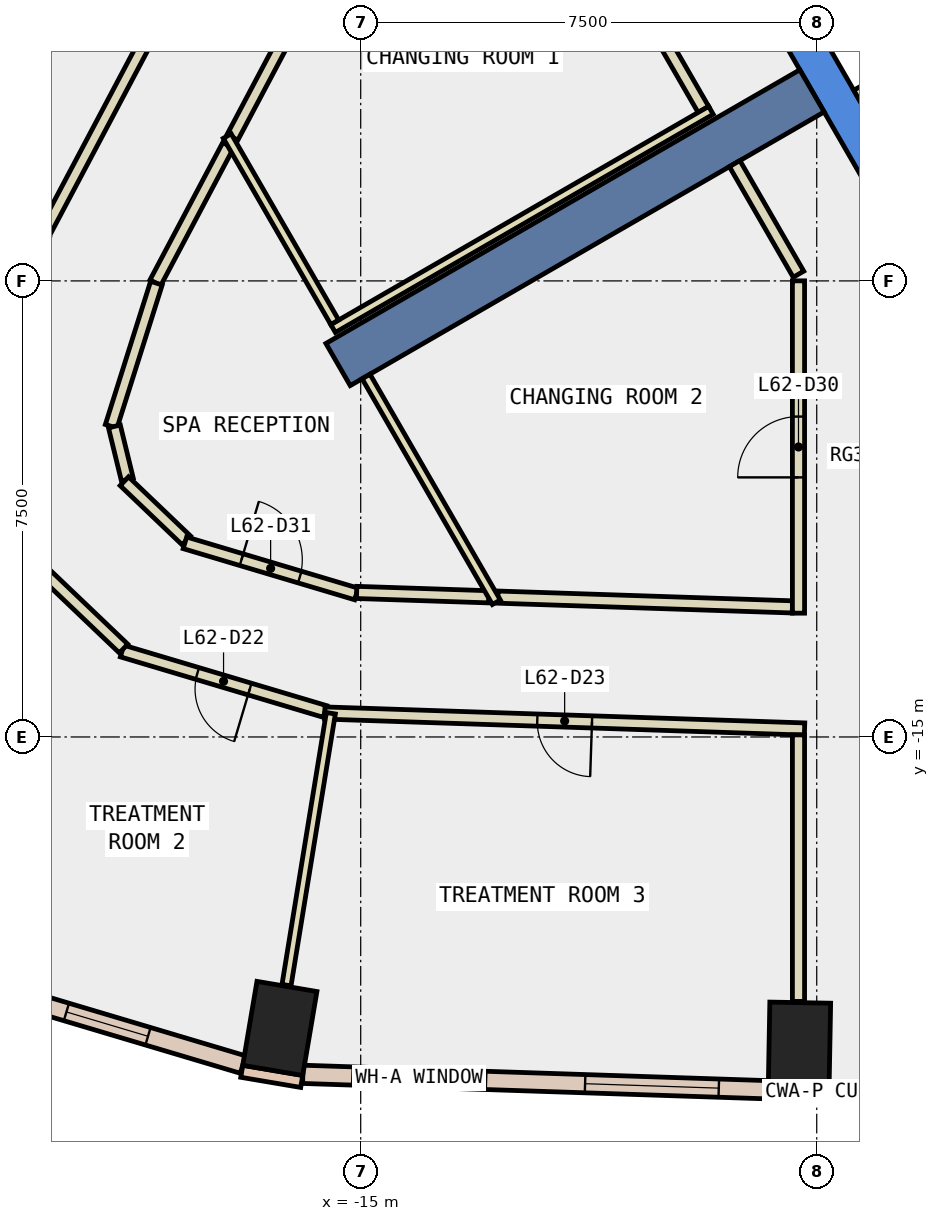
"""IFC4 building model, lengths in metres.
Left out: names, types, materials, properties, quantities, classifications, styles, units other than length and angle.
Written with IfcOpenShell. Run it as: python <this file> out.ifc"""

import sys

from ifc_helpers import new_model, si_unit, direction, frame, frame_2d, origin, origin_2d, place, context, subcontext, project, spatial, polyline, rectangle, outline, extrude, element, fill, save


model = new_model("IFC4")
c1 = context("Model", 3, precision=1e-05, world=origin(), true_north=direction((0.0, 1.0)))
c2 = subcontext(c1, "Body", "Model", "MODEL_VIEW")
j1 = project(units=[si_unit("LENGTHUNIT", "METRE"), si_unit("PLANEANGLEUNIT", "RADIAN")], contexts=[c1])
p1 = place(None, origin())
s1 = spatial("IfcSite", under=j1, at=p1, CompositionType="ELEMENT")
p2 = place(p1, origin())
s2 = spatial("IfcBuilding", under=s1, at=p2, CompositionType="ELEMENT")
p3 = place(p2, frame((0.0, 0.0, 270.2)))
s3 = spatial("IfcBuildingStorey", under=s2, at=p3, CompositionType="ELEMENT", Elevation=270.2)
for number, where, z_axis, x_axis in (
    (1, (-16.33, -19.793, -0.34), (0.0, 0.0, 1.0), (-0.986, 0.167, 0.0)),
    (2, (-7.784, -20.069, -0.34), (0.0, 0.0, 1.0), (-1.0, 0.018, 0.0)),
):
    element("IfcColumn", number, at=place(p3, frame(where, z_axis=z_axis, x_axis=x_axis)), inside=s3, PredefinedType="COLUMN", context=c2, shape_type="SweptSolid", body=[
        extrude(rectangle(XDim=1.0, YDim=1.4, at=origin_2d()), origin(), (0.0, 0.0, 1.0), 3.6),
    ])
p4 = place(p3, frame((0.0, 0.0, -0.34)))
e3 = element("IfcWall", 3, at=p4, inside=s3, PredefinedType="SHEAR", context=c2, shape_type="SweptSolid", body=[
    extrude(outline(polyline([(-11.547, 2.5), (-5.774, -7.5), (-5.427, -6.9), (-10.854, 2.5), (-11.547, 2.5)])), origin(), (0.0, 0.0, 1.0), 3.6),
])
p5 = place(p3, frame((-7.578, -4.375, -0.34), z_axis=(0.0, 0.0, 1.0), x_axis=(-0.866024315419, -0.5000018851, 0.0)))
e4 = element("IfcWall", 4, at=p5, inside=s3, PredefinedType="SHEAR", context=c2, shape_type="SweptSolid", body=[
    extrude(rectangle(XDim=9.0, YDim=0.8, at=frame_2d((4.5, 0.0))), origin(), (0.0, 0.0, 1.0), 3.6),
])
for number, where, z_axis, x_axis in (
    (5, (-16.956, -20.498, 0.0), (0.0, 0.0, 1.0), (0.986, -0.167, 0.0)),
    (6, (-8.298, -20.86, 0.0), (0.0, 0.0, 1.0), (1.0, -0.018, 0.0)),
):
    element("IfcWall", number, at=place(p3, frame(where, z_axis=z_axis, x_axis=x_axis)), inside=s3, PredefinedType="STANDARD", context=c2, shape_type="SweptSolid", body=[
        extrude(rectangle(XDim=1.0, YDim=0.2, at=frame_2d((0.5, 0.0))), origin(), (0.0, 0.0, 1.0), 3.26),
    ])
p6 = place(p3, frame((-15.951, -20.548, 0.0), z_axis=(0.0, 0.0, 1.0), x_axis=(0.999450376985, -0.033150323459, 0.0)))
e7 = element("IfcWall", 7, at=p6, inside=s3, PredefinedType="STANDARD", context=c2, shape_type="SweptSolid", body=[
    extrude(rectangle(XDim=7.659, YDim=0.3, at=frame_2d((3.83, 0.0))), origin(), (0.0, 0.0, 1.0), 3.26),
])
p7 = place(p6, frame((0.815, 0.0, 0.9)))
e8 = element("IfcOpeningElement", 8, at=p7, cuts=e7, PredefinedType="OPENING", context=c2, shape_type="SweptSolid", body=[
    extrude(rectangle(XDim=2.2, YDim=2.0, at=frame_2d((1.1, 1.0))), frame((0.0, 0.16, 0.0), z_axis=(0.0, -1.0, 0.0), x_axis=(1.0, 0.0, 0.0)), (0.0, 0.0, 1.0), 0.32),
])
p8 = place(p6, frame((4.644, 0.0, 0.9)))
e9 = element("IfcOpeningElement", 9, at=p8, cuts=e7, PredefinedType="OPENING", context=c2, shape_type="SweptSolid", body=[
    extrude(rectangle(XDim=2.2, YDim=2.0, at=frame_2d((1.1, 1.0))), frame((0.0, 0.16, 0.0), z_axis=(0.0, -1.0, 0.0), x_axis=(1.0, 0.0, 0.0)), (0.0, 0.0, 1.0), 0.32),
])
p9 = place(p3, frame((-21.401, -19.057, 0.0), z_axis=(0.0, 0.0, 1.0), x_axis=(0.958361270465, -0.285558532131, 0.0)))
e10 = element("IfcWall", 10, at=p9, inside=s3, PredefinedType="STANDARD", context=c2, shape_type="SweptSolid", body=[
    extrude(rectangle(XDim=4.658, YDim=0.3, at=frame_2d((2.329, 0.0))), origin(), (0.0, 0.0, 1.0), 3.26),
])
p10 = place(p9, frame((1.629, 0.0, 0.9)))
e11 = element("IfcOpeningElement", 11, at=p10, cuts=e10, PredefinedType="OPENING", context=c2, shape_type="SweptSolid", body=[
    extrude(rectangle(XDim=1.4, YDim=2.0, at=frame_2d((0.7, 1.0))), frame((0.0, 0.16, 0.0), z_axis=(0.0, -1.0, 0.0), x_axis=(1.0, 0.0, 0.0)), (0.0, 0.0, 1.0), 0.32),
])
p11 = place(p3, frame((-15.56, -2.214, 0.0), z_axis=(0.0, 0.0, 1.0), x_axis=(-0.468104679961, -0.883673021314, 0.0)))
e12 = element("IfcWall", 12, at=p11, inside=s3, PredefinedType="PARTITIONING", context=c2, shape_type="SweptSolid", body=[
    extrude(rectangle(XDim=3.309, YDim=0.2, at=frame_2d((1.654, 0.0))), origin(), (0.0, 0.0, 1.0), 3.26),
])
p12 = place(p3, frame((-12.744, -12.7, 0.0), z_axis=(0.0, 0.0, 1.0), x_axis=(0.999447196828, -0.033246063702, 0.0)))
e13 = element("IfcWall", 13, at=p12, inside=s3, PredefinedType="PARTITIONING", context=c2, shape_type="SweptSolid", body=[
    extrude(rectangle(XDim=4.847, YDim=0.2, at=frame_2d((2.423, 0.0))), origin(), (0.0, 0.0, 1.0), 3.26),
])
p13 = place(p3, frame((-17.18, -5.271, 0.0), z_axis=(0.0, 0.0, 1.0), x_axis=(-0.468212372113, -0.883615965564, 0.0)))
e14 = element("IfcWall", 14, at=p13, inside=s3, PredefinedType="PARTITIONING", context=c2, shape_type="SweptSolid", body=[
    extrude(rectangle(XDim=2.557, YDim=0.2, at=frame_2d((1.278, 0.0))), origin(), (0.0, 0.0, 1.0), 3.26),
])
p14 = place(p3, frame((-18.36, -7.537, 0.0), z_axis=(0.0, 0.0, 1.0), x_axis=(-0.301325410186, -0.953521366922, 0.0)))
e15 = element("IfcWall", 15, at=p14, inside=s3, PredefinedType="PARTITIONING", context=c2, shape_type="SweptSolid", body=[
    extrude(rectangle(XDim=2.469, YDim=0.2, at=frame_2d((1.234, 0.0))), origin(), (0.0, 0.0, 1.0), 3.26),
])
p15 = place(p3, frame((-19.051, -9.893, 0.0), z_axis=(0.0, 0.0, 1.0), x_axis=(0.237162553963, -0.971469980492, 0.0)))
e16 = element("IfcWall", 16, at=p15, inside=s3, PredefinedType="PARTITIONING", context=c2, shape_type="SweptSolid", body=[
    extrude(rectangle(XDim=0.899, YDim=0.2, at=frame_2d((0.449, 0.0))), origin(), (0.0, 0.0, 1.0), 3.26),
])
p16 = place(p3, frame((-18.887, -10.794, 0.0), z_axis=(0.0, 0.0, 1.0), x_axis=(0.723206051435, -0.690632324155, 0.0)))
e17 = element("IfcWall", 17, at=p16, inside=s3, PredefinedType="PARTITIONING", context=c2, shape_type="SweptSolid", body=[
    extrude(rectangle(XDim=1.409, YDim=0.2, at=frame_2d((0.705, 0.0))), origin(), (0.0, 0.0, 1.0), 3.26),
])
p17 = place(p3, frame((-17.891, -11.807, 0.0), z_axis=(0.0, 0.0, 1.0), x_axis=(0.958288558025, -0.28580244848, 0.0)))
e18 = element("IfcWall", 18, at=p17, inside=s3, PredefinedType="PARTITIONING", context=c2, shape_type="SweptSolid", body=[
    extrude(rectangle(XDim=2.943, YDim=0.2, at=frame_2d((1.471, 0.0))), origin(), (0.0, 0.0, 1.0), 3.26),
])
p18 = place(p17, frame((0.971, 0.0, 0.0)))
e19 = element("IfcOpeningElement", 19, at=p18, cuts=e18, PredefinedType="OPENING", context=c2, shape_type="SweptSolid", body=[
    extrude(rectangle(XDim=1.0, YDim=2.1, at=frame_2d((0.5, 1.05))), frame((0.0, 0.11, 0.0), z_axis=(0.0, -1.0, 0.0), x_axis=(1.0, 0.0, 0.0)), (0.0, 0.0, 1.0), 0.22),
])
p19 = place(p3, frame((-15.067, -12.623, 0.0), z_axis=(0.0, 0.0, 1.0), x_axis=(0.99945112134, -0.033127874247, 0.0)))
e20 = element("IfcWall", 20, at=p19, inside=s3, PredefinedType="PARTITIONING", context=c2, shape_type="SweptSolid", body=[
    extrude(rectangle(XDim=2.174, YDim=0.2, at=frame_2d((1.087, 0.0))), origin(), (0.0, 0.0, 1.0), 3.26),
])
p20 = place(p3, frame((-20.229, -6.754, 0.0), z_axis=(0.0, 0.0, 1.0), x_axis=(0.468313568794, 0.883562335822, 0.0)))
e21 = element("IfcWall", 21, at=p20, inside=s3, PredefinedType="PARTITIONING", context=c2, shape_type="SweptSolid", body=[
    extrude(rectangle(XDim=6.216, YDim=0.2, at=frame_2d((3.108, 0.0))), origin(), (0.0, 0.0, 1.0), 3.26),
])
p21 = place(p3, frame((-15.587, -14.581, 0.0), z_axis=(0.0, 0.0, 1.0), x_axis=(-0.958378336681, 0.285501250052, 0.0)))
e22 = element("IfcWall", 22, at=p21, inside=s3, PredefinedType="PARTITIONING", context=c2, shape_type="SweptSolid", body=[
    extrude(rectangle(XDim=3.482, YDim=0.2, at=frame_2d((1.741, 0.0))), origin(), (0.0, 0.0, 1.0), 3.26),
])
p22 = place(p21, frame((1.291, 0.0, 0.0)))
e23 = element("IfcOpeningElement", 23, at=p22, cuts=e22, PredefinedType="OPENING", context=c2, shape_type="SweptSolid", body=[
    extrude(rectangle(XDim=0.9, YDim=2.1, at=frame_2d((0.45, 1.05))), frame((0.0, 0.11, 0.0), z_axis=(0.0, -1.0, 0.0), x_axis=(1.0, 0.0, 0.0)), (0.0, 0.0, 1.0), 0.22),
])
p23 = place(p3, frame((-18.9, -13.546, 0.0), z_axis=(0.0, 0.0, 1.0), x_axis=(-0.723668833869, 0.690147389248, 0.0)))
e24 = element("IfcWall", 24, at=p23, inside=s3, PredefinedType="PARTITIONING", context=c2, shape_type="SweptSolid", body=[
    extrude(rectangle(XDim=2.476, YDim=0.2, at=frame_2d((1.238, 0.0))), origin(), (0.0, 0.0, 1.0), 3.26),
])
p24 = place(p3, frame((-7.7, -14.869, 0.0), z_axis=(0.0, 0.0, 1.0), x_axis=(-0.999445318732, 0.03330247535, 0.0)))
e25 = element("IfcWall", 25, at=p24, inside=s3, PredefinedType="PARTITIONING", context=c2, shape_type="SweptSolid", body=[
    extrude(rectangle(XDim=7.896, YDim=0.2, at=frame_2d((3.948, 0.0))), origin(), (0.0, 0.0, 1.0), 3.26),
])
p25 = place(p24, frame((3.498, 0.0, 0.0)))
e26 = element("IfcOpeningElement", 26, at=p25, cuts=e25, PredefinedType="OPENING", context=c2, shape_type="SweptSolid", body=[
    extrude(rectangle(XDim=0.9, YDim=2.1, at=frame_2d((0.45, 1.05))), frame((0.0, 0.11, 0.0), z_axis=(0.0, -1.0, 0.0), x_axis=(1.0, 0.0, 0.0)), (0.0, 0.0, 1.0), 0.22),
])
p26 = place(p3, frame((-5.888, -3.902, 0.0), z_axis=(0.0, 0.0, 1.0), x_axis=(-0.86621513555, -0.499671230855, 0.0)))
e27 = element("IfcWall", 27, at=p26, inside=s3, PredefinedType="PARTITIONING", context=c2, shape_type="SweptSolid", body=[
    extrude(rectangle(XDim=1.1, YDim=0.2, at=frame_2d((0.55, 0.0))), origin(), (0.0, 0.0, 1.0), 3.26),
])
p27 = place(p3, frame((-9.751, 2.99, 0.0), z_axis=(0.0, 0.0, 1.0), x_axis=(0.500012163284, -0.866018381195, 0.0)))
e28 = element("IfcWall", 28, at=p27, inside=s3, PredefinedType="PARTITIONING", context=c2, shape_type="SweptSolid", body=[
    extrude(rectangle(XDim=8.0, YDim=0.2, at=frame_2d((4.0, 0.0))), origin(), (0.0, 0.0, 1.0), 3.26),
])
p28 = place(p3, frame((-9.364, -4.68, 0.0), z_axis=(0.0, 0.0, 1.0), x_axis=(-0.500052244015, 0.865995238587, 0.0)))
e29 = element("IfcWall", 29, at=p28, inside=s3, PredefinedType="PARTITIONING", context=c2, shape_type="SweptSolid", body=[
    extrude(rectangle(XDim=1.281, YDim=0.2, at=frame_2d((0.641, 0.0))), origin(), (0.0, 0.0, 1.0), 3.26),
])
p29 = place(p3, frame((-7.8, -12.964, 0.0), z_axis=(0.0, 0.0, 1.0), x_axis=(0.0, 1.0, 0.0)))
e30 = element("IfcWall", 30, at=p29, inside=s3, PredefinedType="PARTITIONING", context=c2, shape_type="SweptSolid", body=[
    extrude(rectangle(XDim=5.465, YDim=0.2, at=frame_2d((2.732, 0.0))), origin(), (0.0, 0.0, 1.0), 3.26),
])
p30 = place(p29, frame((2.233, 0.0, 0.0)))
e31 = element("IfcOpeningElement", 31, at=p30, cuts=e30, PredefinedType="OPENING", context=c2, shape_type="SweptSolid", body=[
    extrude(rectangle(XDim=1.0, YDim=2.1, at=frame_2d((0.5, 1.05))), frame((0.0, 0.11, 0.0), z_axis=(0.0, -1.0, 0.0), x_axis=(1.0, 0.0, 0.0)), (0.0, 0.0, 1.0), 0.22),
])
p31 = place(p3, frame((-7.8, -7.39, 0.0), z_axis=(0.0, 0.0, 1.0), x_axis=(-0.499977374825, 0.866038466041, 0.0)))
e32 = element("IfcWall", 32, at=p31, inside=s3, PredefinedType="PARTITIONING", context=c2, shape_type="SweptSolid", body=[
    extrude(rectangle(XDim=2.1, YDim=0.2, at=frame_2d((1.05, 0.0))), origin(), (0.0, 0.0, 1.0), 3.26),
])
p32 = place(p3, frame((-7.8, -19.349, 0.0), z_axis=(0.0, 0.0, 1.0), x_axis=(0.0, 1.0, 0.0)))
e33 = element("IfcWall", 33, at=p32, inside=s3, PredefinedType="PARTITIONING", context=c2, shape_type="SweptSolid", body=[
    extrude(rectangle(XDim=4.383, YDim=0.2, at=frame_2d((2.191, 0.0))), origin(), (0.0, 0.0, 1.0), 3.26),
])
p33 = place(p3, frame((-9.24, -4.695, 0.0), z_axis=(0.0, 0.0, 1.0), x_axis=(-0.866015037582, -0.500017954359, 0.0)))
e34 = element("IfcWall", 34, at=p33, inside=s3, PredefinedType="PARTITIONING", context=c2, shape_type="SweptSolid", body=[
    extrude(rectangle(XDim=7.176, YDim=0.15, at=frame_2d((3.588, 0.0))), origin(), (0.0, 0.0, 1.0), 3.26),
])
p34 = place(p3, frame((-15.427, -8.18, 0.0), z_axis=(0.0, 0.0, 1.0), x_axis=(-0.500045204515, 0.865999303373, 0.0)))
e35 = element("IfcWall", 35, at=p34, inside=s3, PredefinedType="PARTITIONING", context=c2, shape_type="SweptSolid", body=[
    extrude(rectangle(XDim=3.536, YDim=0.15, at=frame_2d((1.768, 0.0))), origin(), (0.0, 0.0, 1.0), 3.26),
])
p35 = place(p3, frame((-12.769, -12.784, 0.0), z_axis=(0.0, 0.0, 1.0), x_axis=(-0.499998569178, 0.866026229868, 0.0)))
e36 = element("IfcWall", 36, at=p35, inside=s3, PredefinedType="PARTITIONING", context=c2, shape_type="SweptSolid", body=[
    extrude(rectangle(XDim=4.286, YDim=0.15, at=frame_2d((2.143, 0.0))), origin(), (0.0, 0.0, 1.0), 3.26),
])
p36 = place(p3, frame((-15.491, -14.61, 0.0), z_axis=(0.0, 0.0, 1.0), x_axis=(-0.160928343418, -0.986966092774, 0.0)))
e37 = element("IfcWall", 37, at=p36, inside=s3, PredefinedType="PARTITIONING", context=c2, shape_type="SweptSolid", body=[
    extrude(rectangle(XDim=4.53, YDim=0.15, at=frame_2d((2.265, 0.0))), origin(), (0.0, 0.0, 1.0), 3.26),
])
p37 = place(p3, frame((-8.192, 0.888, 0.0), z_axis=(0.0, 0.0, 1.0), x_axis=(0.500034260056, -0.866005622828, 0.0)))
e38 = element("IfcWall", 38, at=p37, inside=s3, PredefinedType="STANDARD", context=c2, shape_type="SweptSolid", body=[
    extrude(rectangle(XDim=5.399, YDim=0.2, at=frame_2d((2.7, 0.0))), origin(), (0.0, 0.0, 1.0), 3.26),
])
p38 = place(p7, origin())
e39 = element("IfcWindow", 39, at=p38, inside=s3, PartitioningType="SINGLE_PANEL", PredefinedType="WINDOW", context=c2, shape_type="SweptSolid", body=[
    extrude(rectangle(XDim=2.2, YDim=2.0, at=frame_2d((1.1, 1.0))), frame((0.0, 0.03, 0.0), z_axis=(0.0, -1.0, 0.0), x_axis=(1.0, 0.0, 0.0)), (0.0, 0.0, 1.0), 0.06),
])
fill(e8, e39)
p39 = place(p8, origin())
e40 = element("IfcWindow", 40, at=p39, inside=s3, PartitioningType="SINGLE_PANEL", PredefinedType="WINDOW", context=c2, shape_type="SweptSolid", body=[
    extrude(rectangle(XDim=2.2, YDim=2.0, at=frame_2d((1.1, 1.0))), frame((0.0, 0.03, 0.0), z_axis=(0.0, -1.0, 0.0), x_axis=(1.0, 0.0, 0.0)), (0.0, 0.0, 1.0), 0.06),
])
fill(e9, e40)
p40 = place(p10, origin())
e41 = element("IfcWindow", 41, at=p40, inside=s3, PartitioningType="SINGLE_PANEL", PredefinedType="WINDOW", context=c2, shape_type="SweptSolid", body=[
    extrude(rectangle(XDim=1.4, YDim=2.0, at=frame_2d((0.7, 1.0))), frame((0.0, 0.03, 0.0), z_axis=(0.0, -1.0, 0.0), x_axis=(1.0, 0.0, 0.0)), (0.0, 0.0, 1.0), 0.06),
])
fill(e11, e41)
p41 = place(p22, origin())
e42 = element("IfcDoor", 42, at=p41, inside=s3, OperationType="SINGLE_SWING_LEFT", PredefinedType="DOOR", context=c2, shape_type="SweptSolid", body=[
    extrude(rectangle(XDim=0.9, YDim=2.1, at=frame_2d((0.45, 1.05))), frame((0.0, 0.025, 0.0), z_axis=(0.0, -1.0, 0.0), x_axis=(1.0, 0.0, 0.0)), (0.0, 0.0, 1.0), 0.05),
])
fill(e23, e42)
p42 = place(p25, origin())
e43 = element("IfcDoor", 43, at=p42, inside=s3, OperationType="SINGLE_SWING_LEFT", PredefinedType="DOOR", context=c2, shape_type="SweptSolid", body=[
    extrude(rectangle(XDim=0.9, YDim=2.1, at=frame_2d((0.45, 1.05))), frame((0.0, 0.025, 0.0), z_axis=(0.0, -1.0, 0.0), x_axis=(1.0, 0.0, 0.0)), (0.0, 0.0, 1.0), 0.05),
])
fill(e26, e43)
p43 = place(p30, origin())
e44 = element("IfcDoor", 44, at=p43, inside=s3, OperationType="SINGLE_SWING_LEFT", PredefinedType="DOOR", context=c2, shape_type="SweptSolid", body=[
    extrude(rectangle(XDim=1.0, YDim=2.1, at=frame_2d((0.5, 1.05))), frame((0.0, 0.025, 0.0), z_axis=(0.0, -1.0, 0.0), x_axis=(1.0, 0.0, 0.0)), (0.0, 0.0, 1.0), 0.05),
])
fill(e31, e44)
p44 = place(p18, origin())
e45 = element("IfcDoor", 45, at=p44, inside=s3, OperationType="SINGLE_SWING_LEFT", PredefinedType="DOOR", context=c2, shape_type="SweptSolid", body=[
    extrude(rectangle(XDim=1.0, YDim=2.1, at=frame_2d((0.5, 1.05))), frame((0.0, 0.025, 0.0), z_axis=(0.0, -1.0, 0.0), x_axis=(1.0, 0.0, 0.0)), (0.0, 0.0, 1.0), 0.05),
])
fill(e19, e45)
save(model, sys.argv[1])
